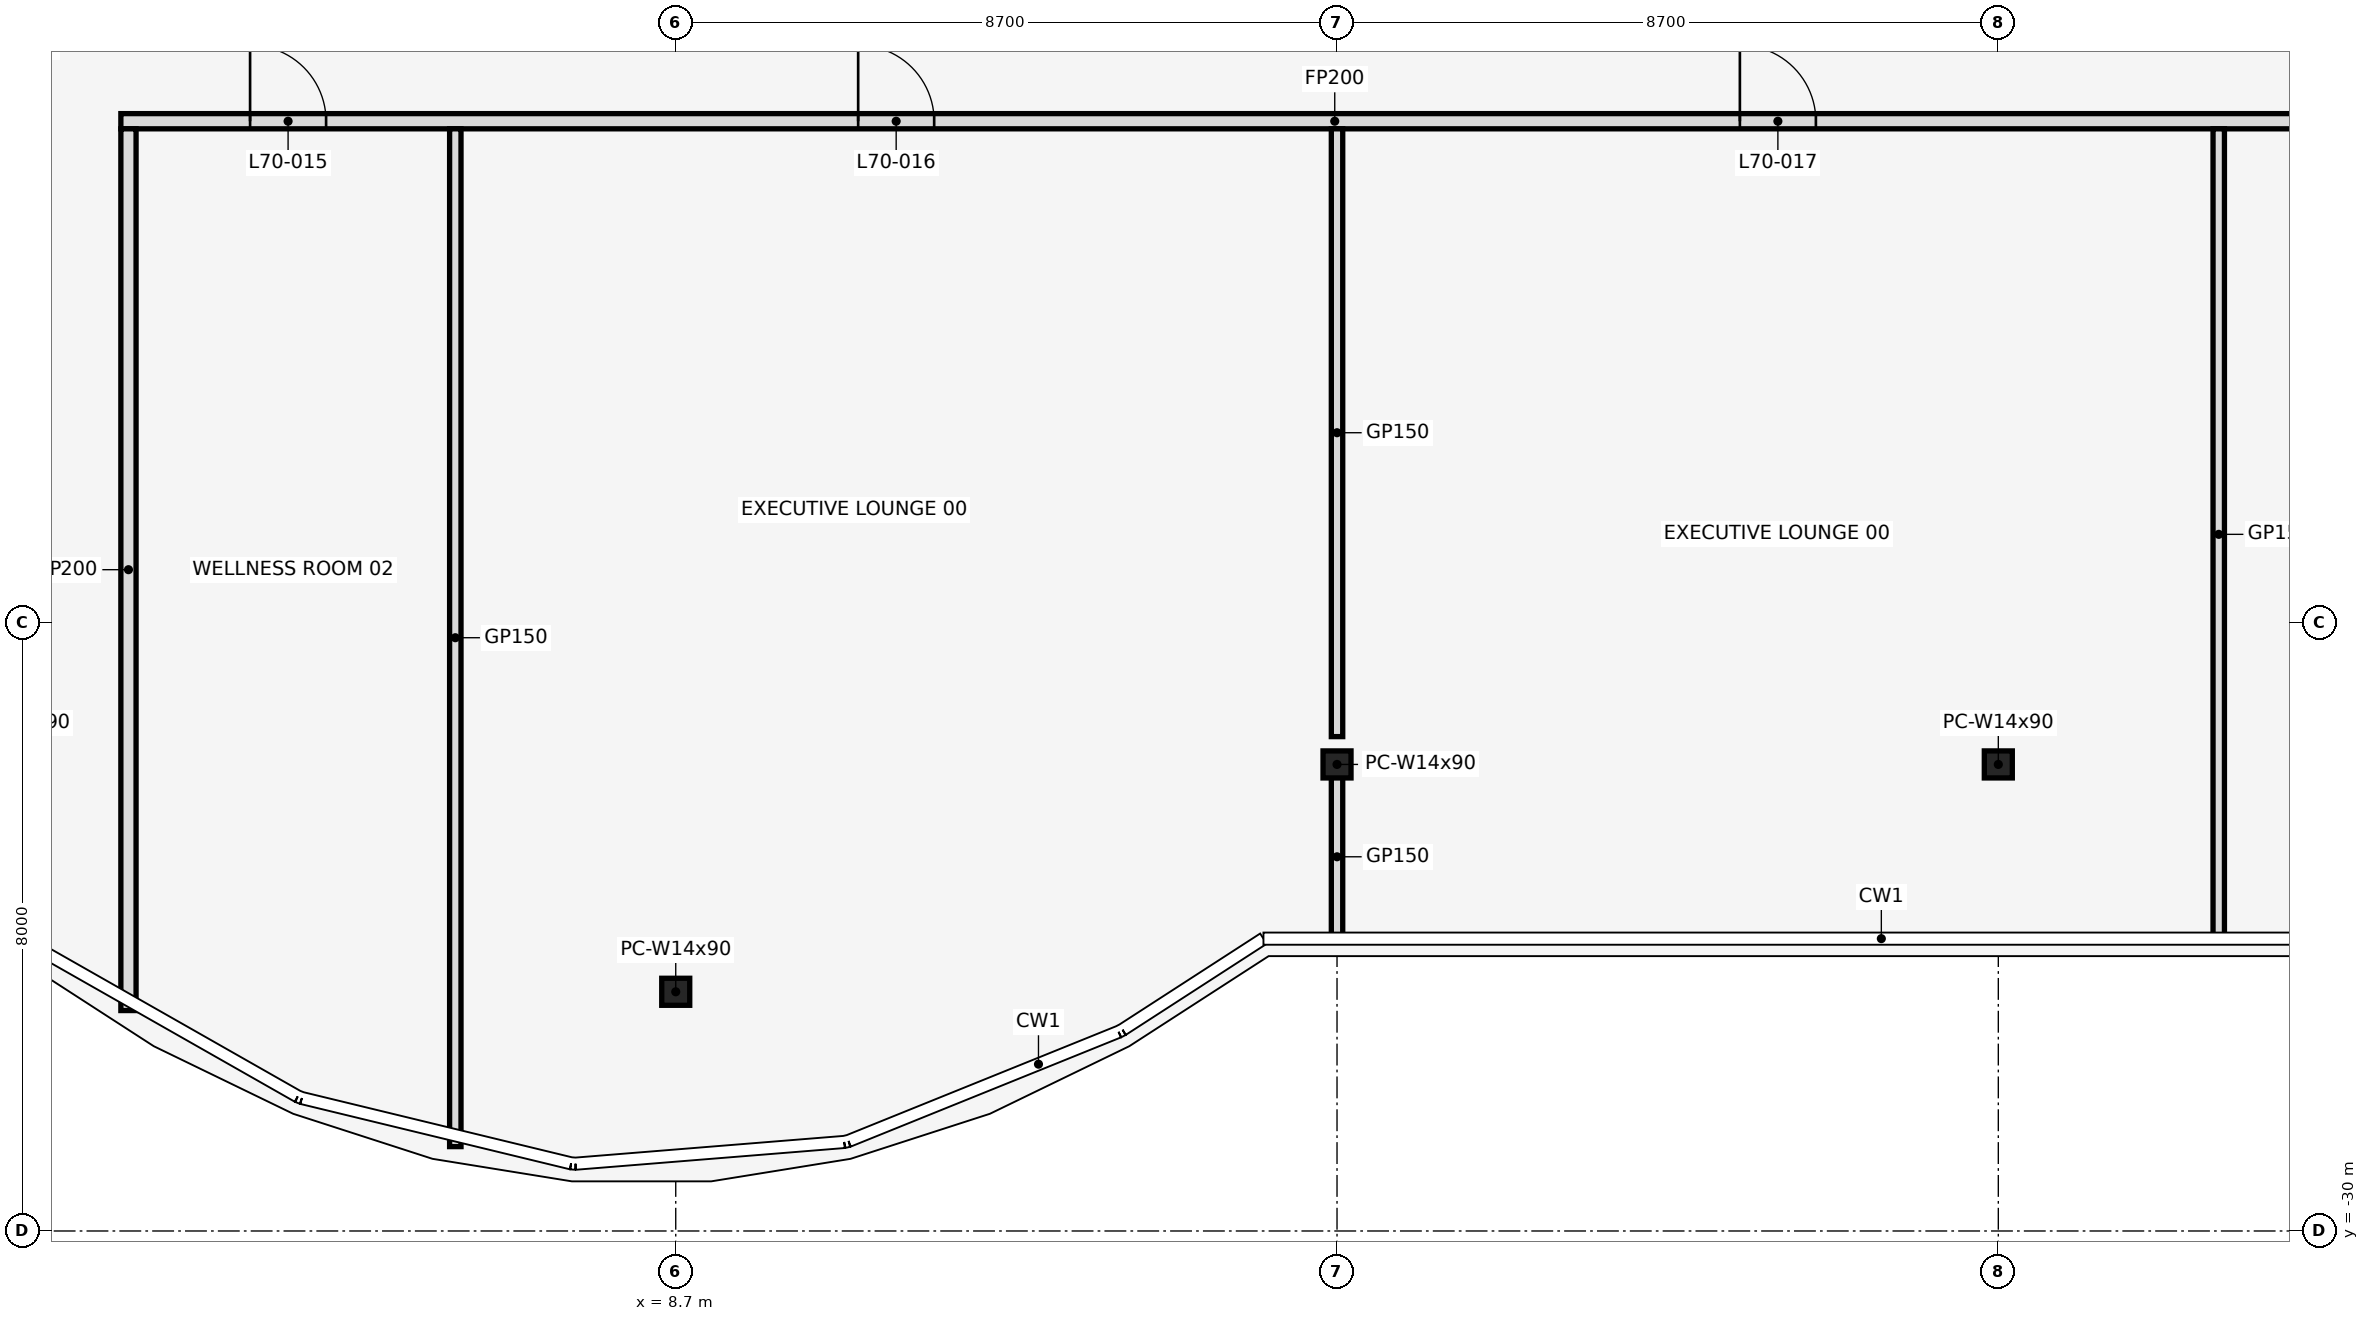
"""IFC4 building model, lengths in metres.
Left out: names, types, materials, properties, quantities, classifications, styles, units other than length and angle.
Written with IfcOpenShell. Run it as: python <this file> out.ifc"""

import sys

from ifc_helpers import new_model, si_unit, direction, frame, frame_2d, origin, origin_2d, place, context, subcontext, project, spatial, rectangle, i_section, extrude, element, fill, save


model = new_model("IFC4")
c1 = context("Model", 3, precision=1e-05, world=origin(), true_north=direction((0.0, 1.0)))
c2 = subcontext(c1, "Body", "Model", "MODEL_VIEW")
j1 = project(units=[si_unit("LENGTHUNIT", "METRE"), si_unit("PLANEANGLEUNIT", "RADIAN")], contexts=[c1])
p1 = place(None, origin())
s1 = spatial("IfcSite", under=j1, at=p1, CompositionType="ELEMENT")
p2 = place(p1, origin())
s2 = spatial("IfcBuilding", under=s1, at=p2, CompositionType="ELEMENT")
p3 = place(p2, frame((0.0, 0.0, 311.0)))
s3 = spatial("IfcBuildingStorey", under=s2, at=p3, CompositionType="ELEMENT", Elevation=311.0)
for number, where, z_axis, x_axis in (
    (1, (8.7, -26.853, 0.0), (0.0, 0.0, 1.0), (1.0, 0.0, 0.0)),
    (2, (17.4, -23.862, 0.0), (0.0, 0.0, 1.0), (1.0, 0.0, 0.0)),
    (3, (26.1, -23.862, 0.0), (0.0, 0.0, 1.0), (1.0, 0.0, 0.0)),
):
    element("IfcColumn", number, at=place(p3, frame(where, z_axis=z_axis, x_axis=x_axis)), inside=s3, PredefinedType="COLUMN", context=c2, shape_type="SweptSolid", body=[
        extrude(i_section(OverallWidth=0.368, OverallDepth=0.356, WebThickness=0.011, FlangeThickness=0.018, at=origin_2d()), origin(), (0.0, 0.0, 1.0), 4.5),
    ])
p4 = place(p3, frame((1.4, -15.4, 0.0), z_axis=(0.0, 0.0, 1.0), x_axis=(1.0, 0.0, 0.0)))
e4 = element("IfcWall", 4, at=p4, inside=s3, PredefinedType="PARTITIONING", context=c2, shape_type="SweptSolid", body=[
    extrude(rectangle(XDim=31.94, YDim=0.2, at=frame_2d((15.97, 0.0))), origin(), (0.0, 0.0, 1.0), 3.418),
])
p5 = place(p4, frame((1.7, 0.0, 0.0)))
e5 = element("IfcOpeningElement", 5, at=p5, cuts=e4, PredefinedType="OPENING", context=c2, shape_type="SweptSolid", body=[
    extrude(rectangle(XDim=1.0, YDim=2.1, at=frame_2d((0.5, 1.05))), frame((0.0, 0.112, 0.0), z_axis=(0.0, -1.0, 0.0), x_axis=(1.0, 0.0, 0.0)), (0.0, 0.0, 1.0), 0.224),
])
p6 = place(p4, frame((9.7, 0.0, 0.0)))
e6 = element("IfcOpeningElement", 6, at=p6, cuts=e4, PredefinedType="OPENING", context=c2, shape_type="SweptSolid", body=[
    extrude(rectangle(XDim=1.0, YDim=2.1, at=frame_2d((0.5, 1.05))), frame((0.0, 0.112, 0.0), z_axis=(0.0, -1.0, 0.0), x_axis=(1.0, 0.0, 0.0)), (0.0, 0.0, 1.0), 0.224),
])
p7 = place(p4, frame((21.3, 0.0, 0.0)))
e7 = element("IfcOpeningElement", 7, at=p7, cuts=e4, PredefinedType="OPENING", context=c2, shape_type="SweptSolid", body=[
    extrude(rectangle(XDim=1.0, YDim=2.1, at=frame_2d((0.5, 1.05))), frame((0.0, 0.112, 0.0), z_axis=(0.0, -1.0, 0.0), x_axis=(1.0, 0.0, 0.0)), (0.0, 0.0, 1.0), 0.224),
])
p8 = place(p4, frame((29.3, 0.0, 0.0)))
e8 = element("IfcOpeningElement", 8, at=p8, cuts=e4, PredefinedType="OPENING", context=c2, shape_type="SweptSolid", body=[
    extrude(rectangle(XDim=1.0, YDim=2.1, at=frame_2d((0.5, 1.05))), frame((0.0, 0.112, 0.0), z_axis=(0.0, -1.0, 0.0), x_axis=(1.0, 0.0, 0.0)), (0.0, 0.0, 1.0), 0.224),
])
p9 = place(p3, frame((1.5, -27.1, 0.0), z_axis=(0.0, 0.0, 1.0), x_axis=(0.0, 1.0, 0.0)))
e9 = element("IfcWall", 9, at=p9, inside=s3, PredefinedType="PARTITIONING", context=c2, shape_type="SweptSolid", body=[
    extrude(rectangle(XDim=11.6, YDim=0.2, at=frame_2d((5.8, 0.0))), origin(), (0.0, 0.0, 1.0), 3.418),
])
p10 = place(p3, frame((5.8, -28.89, 0.0), z_axis=(0.0, 0.0, 1.0), x_axis=(0.0, 1.0, 0.0)))
e10 = element("IfcWall", 10, at=p10, inside=s3, PredefinedType="PARTITIONING", context=c2, shape_type="SweptSolid", body=[
    extrude(rectangle(XDim=13.39, YDim=0.15, at=frame_2d((6.695, 0.0))), origin(), (0.0, 0.0, 1.0), 3.418),
])
p11 = place(p3, frame((17.4, -26.17, 0.0), z_axis=(0.0, 0.0, 1.0), x_axis=(0.0, 1.0, 0.0)))
e11 = element("IfcWall", 11, at=p11, inside=s3, PredefinedType="PARTITIONING", context=c2, shape_type="SweptSolid", body=[
    extrude(rectangle(XDim=2.186, YDim=0.15, at=frame_2d((1.093, 0.0))), origin(), (0.0, 0.0, 1.0), 3.418),
])
p12 = place(p3, frame((17.4, -23.496, 0.0), z_axis=(0.0, 0.0, 1.0), x_axis=(0.0, 1.0, 0.0)))
e12 = element("IfcWall", 12, at=p12, inside=s3, PredefinedType="PARTITIONING", context=c2, shape_type="SweptSolid", body=[
    extrude(rectangle(XDim=7.996, YDim=0.15, at=frame_2d((3.998, 0.0))), origin(), (0.0, 0.0, 1.0), 3.418),
])
p13 = place(p3, frame((29.0, -26.17, 0.0), z_axis=(0.0, 0.0, 1.0), x_axis=(0.0, 1.0, 0.0)))
e13 = element("IfcWall", 13, at=p13, inside=s3, PredefinedType="PARTITIONING", context=c2, shape_type="SweptSolid", body=[
    extrude(rectangle(XDim=10.67, YDim=0.15, at=frame_2d((5.335, 0.0))), origin(), (0.0, 0.0, 1.0), 3.418),
])
p14 = place(p5, frame((1.0, 0.0, 0.0), z_axis=(0.0, 0.0, 1.0), x_axis=(-1.0, 0.0, 0.0)))
e14 = element("IfcDoor", 14, at=p14, inside=s3, OperationType="SINGLE_SWING_RIGHT", PredefinedType="DOOR", context=c2, shape_type="SweptSolid", body=[
    extrude(rectangle(XDim=1.0, YDim=2.1, at=frame_2d((0.5, 1.05))), frame((0.0, 0.025, 0.0), z_axis=(0.0, -1.0, 0.0), x_axis=(1.0, 0.0, 0.0)), (0.0, 0.0, 1.0), 0.05),
])
fill(e5, e14)
p15 = place(p6, frame((1.0, 0.0, 0.0), z_axis=(0.0, 0.0, 1.0), x_axis=(-1.0, 0.0, 0.0)))
e15 = element("IfcDoor", 15, at=p15, inside=s3, OperationType="SINGLE_SWING_LEFT", PredefinedType="DOOR", context=c2, shape_type="SweptSolid", body=[
    extrude(rectangle(XDim=1.0, YDim=2.1, at=frame_2d((0.5, 1.05))), frame((0.0, 0.025, 0.0), z_axis=(0.0, -1.0, 0.0), x_axis=(1.0, 0.0, 0.0)), (0.0, 0.0, 1.0), 0.05),
])
fill(e6, e15)
p16 = place(p7, frame((1.0, 0.0, 0.0), z_axis=(0.0, 0.0, 1.0), x_axis=(-1.0, 0.0, 0.0)))
e16 = element("IfcDoor", 16, at=p16, inside=s3, OperationType="SINGLE_SWING_RIGHT", PredefinedType="DOOR", context=c2, shape_type="SweptSolid", body=[
    extrude(rectangle(XDim=1.0, YDim=2.1, at=frame_2d((0.5, 1.05))), frame((0.0, 0.025, 0.0), z_axis=(0.0, -1.0, 0.0), x_axis=(1.0, 0.0, 0.0)), (0.0, 0.0, 1.0), 0.05),
])
fill(e7, e16)
save(model, sys.argv[1])
